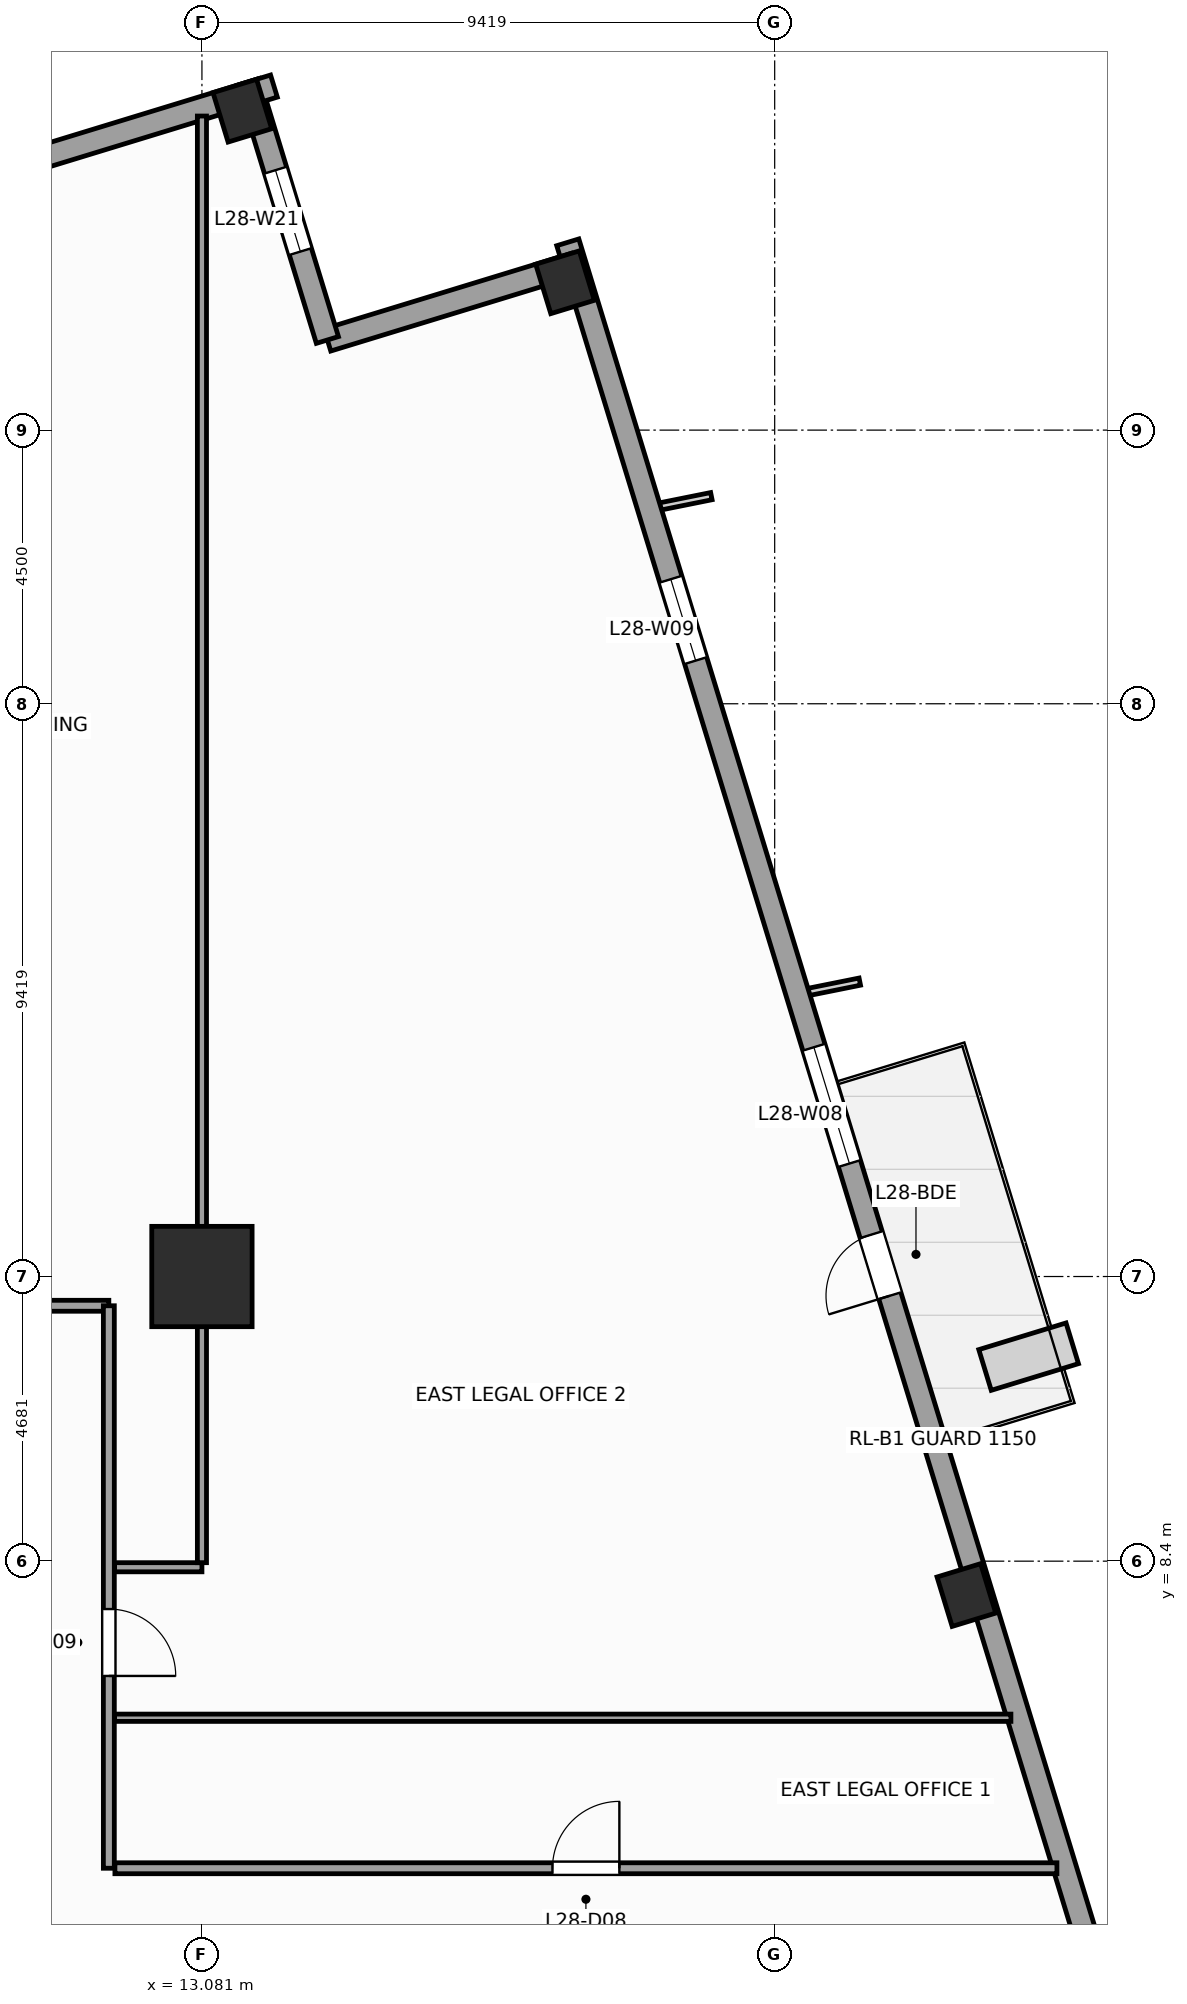
"""IFC4 building model, lengths in metres.
Left out: names, types, materials, properties, quantities, classifications, styles, units other than length and angle.
Written with IfcOpenShell. Run it as: python <this file> out.ifc"""

import sys

from ifc_helpers import new_model, si_unit, direction, frame, frame_2d, origin, origin_2d, place, context, subcontext, project, spatial, rectangle, extrude, source, transform, mapped, element, fill, save


model = new_model("IFC4")
c1 = context("Model", 3, precision=1e-05, world=origin(), true_north=direction((0.0, 1.0)))
c2 = subcontext(c1, "Body", "Model", "MODEL_VIEW")
j1 = project(units=[si_unit("LENGTHUNIT", "METRE"), si_unit("PLANEANGLEUNIT", "RADIAN")], contexts=[c1])
p1 = place(None, origin())
s1 = spatial("IfcSite", under=j1, at=p1, CompositionType="ELEMENT")
p2 = place(p1, origin())
s2 = spatial("IfcBuilding", under=s1, at=p2, CompositionType="ELEMENT")
p3 = place(p2, frame((0.0, 0.0, 119.2)))
s3 = spatial("IfcBuildingStorey", under=s2, at=p3, CompositionType="ELEMENT", Elevation=119.2)
m1 = source(origin(), c2, "Body", "SweptSolid", [
    extrude(rectangle(XDim=1.65, YDim=1.65, at=origin_2d()), origin(), (0.0, 0.0, 1.0), 4.0),
])
p4 = place(p3, frame((13.081, 13.081, 0.0), z_axis=(0.0, 0.0, 1.0), x_axis=(1.0, 0.0, 0.0)))
e1 = element("IfcColumn", 1, at=p4, inside=s3, PredefinedType="COLUMN", context=c2, shape_type="MappedRepresentation", body=[
    mapped(m1, transform((0.0, 0.0, 0.0), scale=1.0)),
])
m2 = source(origin(), c2, "Body", "SweptSolid", [
    extrude(rectangle(XDim=0.75, YDim=0.85, at=origin_2d()), origin(), (0.0, 0.0, 1.0), 4.0),
])
for number, where, z_axis, x_axis in (
    (2, (25.653, 7.843, 0.0), (0.0, 0.0, 1.0), (0.956, 0.292, 0.0)),
    (3, (19.052, 29.431, 0.0), (0.0, 0.0, 1.0), (0.956, 0.292, 0.0)),
    (4, (13.746, 32.253, 0.0), (0.0, 0.0, 1.0), (0.956, 0.292, 0.0)),
):
    element("IfcColumn", number, at=place(p3, frame(where, z_axis=z_axis, x_axis=x_axis)), inside=s3, PredefinedType="COLUMN", context=c2, shape_type="MappedRepresentation", body=[
        mapped(m2, transform((0.0, 0.0, 0.0), scale=1.0)),
    ])
p5 = place(p3, frame((32.658, -14.265, 0.0), z_axis=(0.0, 0.0, 1.0), x_axis=(-0.292373127906, 0.956304320851, 0.0)))
e5 = element("IfcWall", 5, at=p5, inside=s3, PredefinedType="STANDARD", context=c2, shape_type="SweptSolid", body=[
    extrude(rectangle(XDim=46.38, YDim=0.38, at=frame_2d((23.19, 0.0))), origin(), (0.0, 0.0, 1.0), 3.14),
])
p6 = place(p5, frame((28.265, 0.0, 0.0)))
e6 = element("IfcOpeningElement", 6, at=p6, cuts=e5, PredefinedType="OPENING", context=c2, shape_type="SweptSolid", body=[
    extrude(rectangle(XDim=1.05, YDim=2.25, at=frame_2d((0.525, 1.125))), frame((0.0, 0.2, 0.0), z_axis=(0.0, -1.0, 0.0), x_axis=(1.0, 0.0, 0.0)), (0.0, 0.0, 1.0), 0.4),
])
p7 = place(p5, frame((4.865, 0.0, 0.51)))
e7 = element("IfcOpeningElement", 7, at=p7, cuts=e5, PredefinedType="OPENING", context=c2, shape_type="SweptSolid", body=[
    extrude(rectangle(XDim=1.4, YDim=2.4, at=frame_2d((0.7, 1.2))), frame((0.0, 0.2, 0.0), z_axis=(0.0, -1.0, 0.0), x_axis=(1.0, 0.0, 0.0)), (0.0, 0.0, 1.0), 0.4),
])
p8 = place(p5, frame((12.45, 0.0, 0.51)))
e8 = element("IfcOpeningElement", 8, at=p8, cuts=e5, PredefinedType="OPENING", context=c2, shape_type="SweptSolid", body=[
    extrude(rectangle(XDim=2.0, YDim=2.4, at=frame_2d((1.0, 1.2))), frame((0.0, 0.2, 0.0), z_axis=(0.0, -1.0, 0.0), x_axis=(1.0, 0.0, 0.0)), (0.0, 0.0, 1.0), 0.4),
])
p9 = place(p5, frame((30.538, 0.0, 0.51)))
e9 = element("IfcOpeningElement", 9, at=p9, cuts=e5, PredefinedType="OPENING", context=c2, shape_type="SweptSolid", body=[
    extrude(rectangle(XDim=2.0, YDim=2.4, at=frame_2d((1.0, 1.2))), frame((0.0, 0.2, 0.0), z_axis=(0.0, -1.0, 0.0), x_axis=(1.0, 0.0, 0.0)), (0.0, 0.0, 1.0), 0.4),
])
p10 = place(p5, frame((39.187, 0.0, 0.51)))
e10 = element("IfcOpeningElement", 10, at=p10, cuts=e5, PredefinedType="OPENING", context=c2, shape_type="SweptSolid", body=[
    extrude(rectangle(XDim=1.4, YDim=2.4, at=frame_2d((0.7, 1.2))), frame((0.0, 0.2, 0.0), z_axis=(0.0, -1.0, 0.0), x_axis=(1.0, 0.0, 0.0)), (0.0, 0.0, 1.0), 0.4),
])
p11 = place(p3, frame((19.208, 29.725, 0.0), z_axis=(0.0, 0.0, 1.0), x_axis=(-0.956312764915, -0.292345507338, 0.0)))
e11 = element("IfcWall", 11, at=p11, inside=s3, PredefinedType="STANDARD", context=c2, shape_type="SweptSolid", body=[
    extrude(rectangle(XDim=4.25, YDim=0.38, at=frame_2d((2.125, 0.0))), origin(), (0.0, 0.0, 1.0), 3.74),
])
p12 = place(p3, frame((15.144, 28.482, 0.0), z_axis=(0.0, 0.0, 1.0), x_axis=(-0.292373601522, 0.956304176051, 0.0)))
e12 = element("IfcWall", 12, at=p12, inside=s3, PredefinedType="STANDARD", context=c2, shape_type="SweptSolid", body=[
    extrude(rectangle(XDim=4.44, YDim=0.38, at=frame_2d((2.22, 0.0))), origin(), (0.0, 0.0, 1.0), 3.04),
])
p13 = place(p12, frame((1.52, 0.0, 0.51)))
e13 = element("IfcOpeningElement", 13, at=p13, cuts=e12, PredefinedType="OPENING", context=c2, shape_type="SweptSolid", body=[
    extrude(rectangle(XDim=1.4, YDim=2.4, at=frame_2d((0.7, 1.2))), frame((0.0, 0.2, 0.0), z_axis=(0.0, -1.0, 0.0), x_axis=(1.0, 0.0, 0.0)), (0.0, 0.0, 1.0), 0.4),
])
p14 = place(p3, frame((14.265, 32.658, 0.0), z_axis=(0.0, 0.0, 1.0), x_axis=(-0.956304320851, -0.292373127906, 0.0)))
e14 = element("IfcWall", 14, at=p14, inside=s3, PredefinedType="STANDARD", context=c2, shape_type="SweptSolid", body=[
    extrude(rectangle(XDim=46.38, YDim=0.38, at=frame_2d((23.19, 0.0))), origin(), (0.0, 0.0, 1.0), 3.14),
])
p15 = place(p14, frame((4.865, 0.0, 0.51)))
e15 = element("IfcOpeningElement", 15, at=p15, cuts=e14, PredefinedType="OPENING", context=c2, shape_type="SweptSolid", body=[
    extrude(rectangle(XDim=1.4, YDim=2.4, at=frame_2d((0.7, 1.2))), frame((0.0, 0.2, 0.0), z_axis=(0.0, -1.0, 0.0), x_axis=(1.0, 0.0, 0.0)), (0.0, 0.0, 1.0), 0.4),
])
p16 = place(p14, frame((12.45, 0.0, 0.51)))
e16 = element("IfcOpeningElement", 16, at=p16, cuts=e14, PredefinedType="OPENING", context=c2, shape_type="SweptSolid", body=[
    extrude(rectangle(XDim=2.0, YDim=2.4, at=frame_2d((1.0, 1.2))), frame((0.0, 0.2, 0.0), z_axis=(0.0, -1.0, 0.0), x_axis=(1.0, 0.0, 0.0)), (0.0, 0.0, 1.0), 0.4),
])
p17 = place(p14, frame((20.512, 0.0, 0.51)))
e17 = element("IfcOpeningElement", 17, at=p17, cuts=e14, PredefinedType="OPENING", context=c2, shape_type="SweptSolid", body=[
    extrude(rectangle(XDim=2.0, YDim=2.4, at=frame_2d((1.0, 1.2))), frame((0.0, 0.2, 0.0), z_axis=(0.0, -1.0, 0.0), x_axis=(1.0, 0.0, 0.0)), (0.0, 0.0, 1.0), 0.4),
])
p18 = place(p14, frame((30.538, 0.0, 0.51)))
e18 = element("IfcOpeningElement", 18, at=p18, cuts=e14, PredefinedType="OPENING", context=c2, shape_type="SweptSolid", body=[
    extrude(rectangle(XDim=2.0, YDim=2.4, at=frame_2d((1.0, 1.2))), frame((0.0, 0.2, 0.0), z_axis=(0.0, -1.0, 0.0), x_axis=(1.0, 0.0, 0.0)), (0.0, 0.0, 1.0), 0.4),
])
p19 = place(p14, frame((39.187, 0.0, 0.51)))
e19 = element("IfcOpeningElement", 19, at=p19, cuts=e14, PredefinedType="OPENING", context=c2, shape_type="SweptSolid", body=[
    extrude(rectangle(XDim=1.4, YDim=2.4, at=frame_2d((0.7, 1.2))), frame((0.0, 0.2, 0.0), z_axis=(0.0, -1.0, 0.0), x_axis=(1.0, 0.0, 0.0)), (0.0, 0.0, 1.0), 0.4),
])
p20 = place(p3, frame((-10.45, 12.6, 0.0), z_axis=(0.0, 0.0, 1.0), x_axis=(1.0, 0.0, 0.0)))
e20 = element("IfcWall", 20, at=p20, inside=s3, PredefinedType="PARTITIONING", context=c2, shape_type="SweptSolid", body=[
    extrude(rectangle(XDim=22.0, YDim=0.18, at=frame_2d((11.0, 0.0))), origin(), (0.0, 0.0, 1.0), 3.74),
])
p21 = place(p20, frame((4.839, 0.0, 0.0)))
e21 = element("IfcOpeningElement", 21, at=p21, cuts=e20, PredefinedType="OPENING", context=c2, shape_type="SweptSolid", body=[
    extrude(rectangle(XDim=1.1, YDim=2.2, at=frame_2d((0.55, 1.1))), frame((0.0, 0.1, 0.0), z_axis=(0.0, -1.0, 0.0), x_axis=(1.0, 0.0, 0.0)), (0.0, 0.0, 1.0), 0.2),
])
p22 = place(p20, frame((13.1, 0.0, 0.0)))
e22 = element("IfcOpeningElement", 22, at=p22, cuts=e20, PredefinedType="OPENING", context=c2, shape_type="SweptSolid", body=[
    extrude(rectangle(XDim=1.1, YDim=2.2, at=frame_2d((0.55, 1.1))), frame((0.0, 0.1, 0.0), z_axis=(0.0, -1.0, 0.0), x_axis=(1.0, 0.0, 0.0)), (0.0, 0.0, 1.0), 0.2),
])
p23 = place(p20, frame((18.71, 0.0, 0.0)))
e23 = element("IfcOpeningElement", 23, at=p23, cuts=e20, PredefinedType="OPENING", context=c2, shape_type="SweptSolid", body=[
    extrude(rectangle(XDim=1.1, YDim=2.2, at=frame_2d((0.55, 1.1))), frame((0.0, 0.1, 0.0), z_axis=(0.0, -1.0, 0.0), x_axis=(1.0, 0.0, 0.0)), (0.0, 0.0, 1.0), 0.2),
])
p24 = place(p3, frame((11.55, 3.35, 0.0), z_axis=(0.0, 0.0, 1.0), x_axis=(0.0, 1.0, 0.0)))
e24 = element("IfcWall", 24, at=p24, inside=s3, PredefinedType="PARTITIONING", context=c2, shape_type="SweptSolid", body=[
    extrude(rectangle(XDim=9.25, YDim=0.18, at=frame_2d((4.625, 0.0))), origin(), (0.0, 0.0, 1.0), 3.74),
])
p25 = place(p24, frame((3.163, 0.0, 0.0)))
e25 = element("IfcOpeningElement", 25, at=p25, cuts=e24, PredefinedType="OPENING", context=c2, shape_type="SweptSolid", body=[
    extrude(rectangle(XDim=1.1, YDim=2.2, at=frame_2d((0.55, 1.1))), frame((0.0, 0.1, 0.0), z_axis=(0.0, -1.0, 0.0), x_axis=(1.0, 0.0, 0.0)), (0.0, 0.0, 1.0), 0.2),
])
p26 = place(p3, frame((11.65, 3.35, 0.0), z_axis=(0.0, 0.0, 1.0), x_axis=(1.0, 0.0, 0.0)))
e26 = element("IfcWall", 26, at=p26, inside=s3, PredefinedType="PARTITIONING", context=c2, shape_type="SweptSolid", body=[
    extrude(rectangle(XDim=15.492, YDim=0.18, at=frame_2d((7.746, 0.0))), origin(), (0.0, 0.0, 1.0), 3.74),
])
p27 = place(p26, frame((7.196, 0.0, 0.0)))
e27 = element("IfcOpeningElement", 27, at=p27, cuts=e26, PredefinedType="OPENING", context=c2, shape_type="SweptSolid", body=[
    extrude(rectangle(XDim=1.1, YDim=2.2, at=frame_2d((0.55, 1.1))), frame((0.0, 0.1, 0.0), z_axis=(0.0, -1.0, 0.0), x_axis=(1.0, 0.0, 0.0)), (0.0, 0.0, 1.0), 0.2),
])
p28 = place(p3, frame((11.645, 8.3, 0.0), z_axis=(0.0, 0.0, 1.0), x_axis=(1.0, 0.0, 0.0)))
e28 = element("IfcWall", 28, at=p28, inside=s3, PredefinedType="PARTITIONING", context=c2, shape_type="SweptSolid", body=[
    extrude(rectangle(XDim=1.436, YDim=0.15, at=frame_2d((0.718, 0.0))), origin(), (0.0, 0.0, 1.0), 3.74),
])
p29 = place(p3, frame((13.081, 8.375, 0.0), z_axis=(0.0, 0.0, 1.0), x_axis=(0.0, 1.0, 0.0)))
e29 = element("IfcWall", 29, at=p29, inside=s3, PredefinedType="PARTITIONING", context=c2, shape_type="SweptSolid", body=[
    extrude(rectangle(XDim=23.79, YDim=0.15, at=frame_2d((11.895, 0.0))), origin(), (0.0, 0.0, 1.0), 2.732),
])
p30 = place(p3, frame((11.645, 5.825, 0.0), z_axis=(0.0, 0.0, 1.0), x_axis=(1.0, 0.0, 0.0)))
e30 = element("IfcWall", 30, at=p30, inside=s3, PredefinedType="PARTITIONING", context=c2, shape_type="SweptSolid", body=[
    extrude(rectangle(XDim=14.74, YDim=0.12, at=frame_2d((7.37, 0.0))), origin(), (0.0, 0.0, 1.0), 3.74),
])
m3 = source(origin(), c2, "Body", "SweptSolid", [
    extrude(rectangle(XDim=1.05, YDim=2.25, at=frame_2d((0.525, 1.125))), frame((0.0, 0.025, 0.0), z_axis=(0.0, -1.0, 0.0), x_axis=(1.0, 0.0, 0.0)), (0.0, 0.0, 1.0), 0.05),
])
p31 = place(p6, origin())
e31 = element("IfcDoor", 31, at=p31, inside=s3, OperationType="SINGLE_SWING_LEFT", PredefinedType="DOOR", context=c2, shape_type="MappedRepresentation", body=[
    mapped(m3, transform((0.0, 0.0, 0.0), scale=1.0)),
])
fill(e6, e31)
m4 = source(origin(), c2, "Body", "SweptSolid", [
    extrude(rectangle(XDim=2.0, YDim=2.4, at=frame_2d((1.0, 1.2))), frame((0.0, 0.03, 0.0), z_axis=(0.0, -1.0, 0.0), x_axis=(1.0, 0.0, 0.0)), (0.0, 0.0, 1.0), 0.06),
])
p32 = place(p9, origin())
e32 = element("IfcWindow", 32, at=p32, inside=s3, PartitioningType="SINGLE_PANEL", PredefinedType="WINDOW", context=c2, shape_type="MappedRepresentation", body=[
    mapped(m4, transform((0.0, 0.0, 0.0), scale=1.0)),
])
fill(e9, e32)
m5 = source(origin(), c2, "Body", "SweptSolid", [
    extrude(rectangle(XDim=1.4, YDim=2.4, at=frame_2d((0.7, 1.2))), frame((0.0, 0.03, 0.0), z_axis=(0.0, -1.0, 0.0), x_axis=(1.0, 0.0, 0.0)), (0.0, 0.0, 1.0), 0.06),
])
p33 = place(p10, origin())
e33 = element("IfcWindow", 33, at=p33, inside=s3, PartitioningType="SINGLE_PANEL", PredefinedType="WINDOW", context=c2, shape_type="MappedRepresentation", body=[
    mapped(m5, transform((0.0, 0.0, 0.0), scale=1.0)),
])
fill(e10, e33)
p34 = place(p13, origin())
e34 = element("IfcWindow", 34, at=p34, inside=s3, PartitioningType="SINGLE_PANEL", PredefinedType="WINDOW", context=c2, shape_type="MappedRepresentation", body=[
    mapped(m5, transform((0.0, 0.0, 0.0), scale=1.0)),
])
fill(e13, e34)
m6 = source(origin(), c2, "Body", "SweptSolid", [
    extrude(rectangle(XDim=1.1, YDim=2.2, at=frame_2d((0.55, 1.1))), frame((0.0, 0.025, 0.0), z_axis=(0.0, -1.0, 0.0), x_axis=(1.0, 0.0, 0.0)), (0.0, 0.0, 1.0), 0.05),
])
p35 = place(p27, origin())
e35 = element("IfcDoor", 35, at=p35, inside=s3, OperationType="SINGLE_SWING_RIGHT", PredefinedType="DOOR", context=c2, shape_type="MappedRepresentation", body=[
    mapped(m6, transform((0.0, 0.0, 0.0), scale=1.0)),
])
fill(e27, e35)
p36 = place(p25, frame((1.1, 0.0, 0.0), z_axis=(0.0, 0.0, 1.0), x_axis=(-1.0, 0.0, 0.0)))
e36 = element("IfcDoor", 36, at=p36, inside=s3, OperationType="SINGLE_SWING_LEFT", PredefinedType="DOOR", context=c2, shape_type="MappedRepresentation", body=[
    mapped(m6, transform((0.0, 0.0, 0.0), scale=1.0)),
])
fill(e25, e36)
save(model, sys.argv[1])
